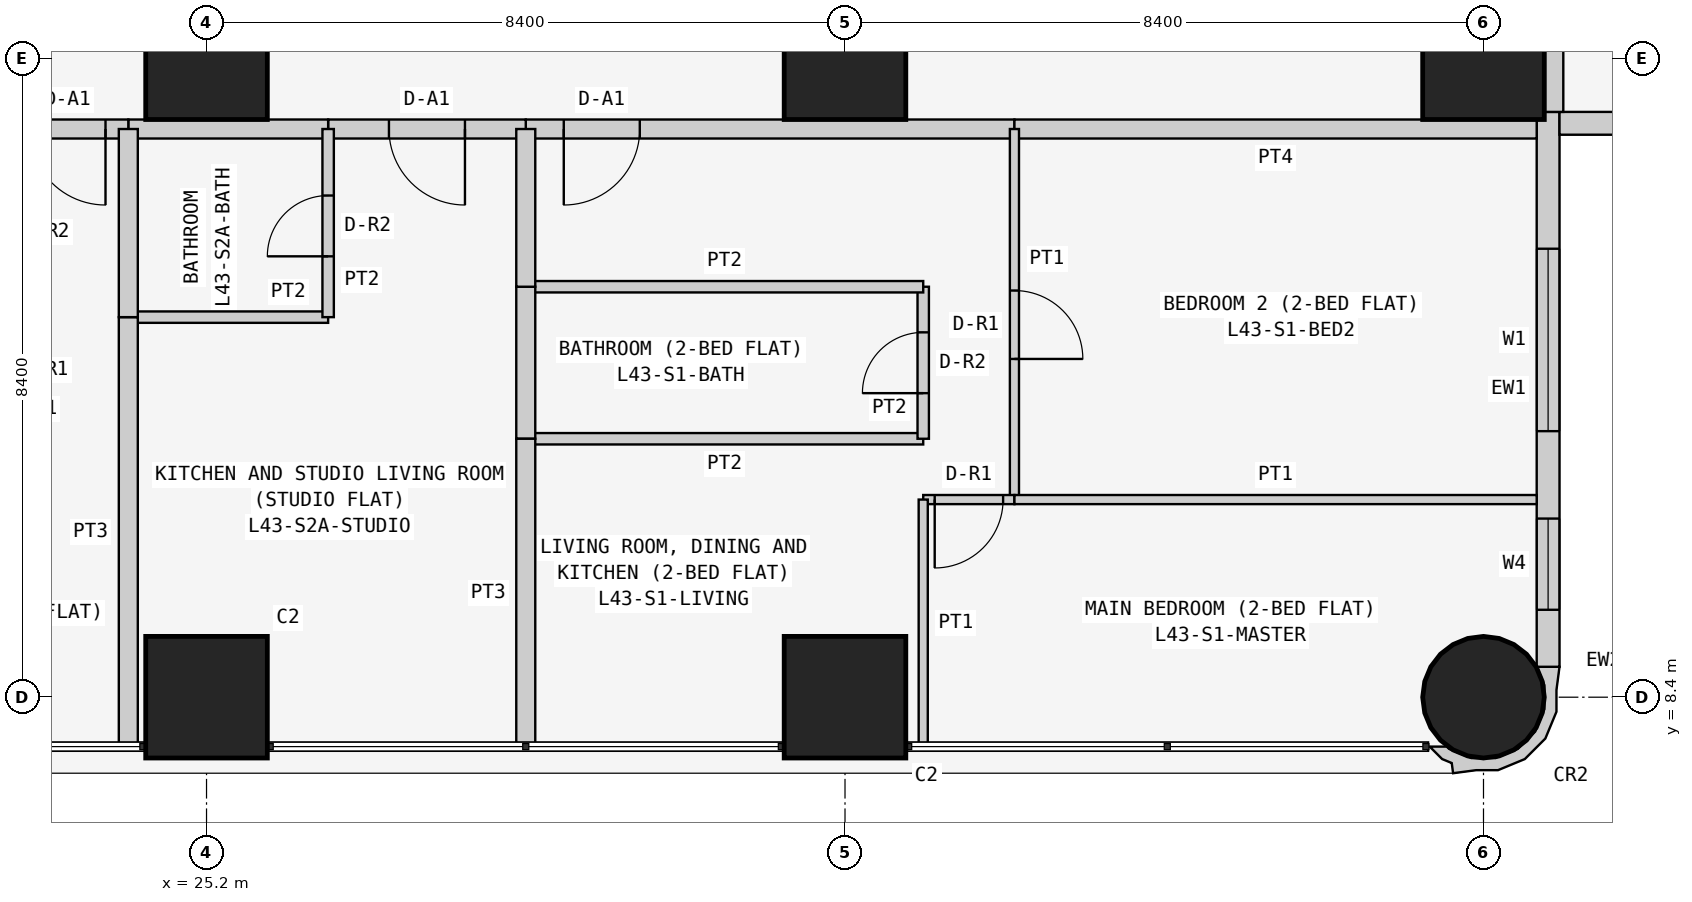
"""IFC4 building model, lengths in metres.
Left out: names, types, materials, properties, quantities, classifications, styles, units other than length and angle.
Written with IfcOpenShell. Run it as: python <this file> out.ifc"""

import sys

from ifc_helpers import new_model, si_unit, direction, frame, frame_2d, origin, origin_2d, place, context, subcontext, project, spatial, polyline, rectangle, circle, outline, extrude, element, fill, save


model = new_model("IFC4")
c1 = context("Model", 3, precision=1e-05, world=origin(), true_north=direction((0.0, 1.0)))
c2 = subcontext(c1, "Body", "Model", "MODEL_VIEW")
j1 = project(units=[si_unit("LENGTHUNIT", "METRE"), si_unit("PLANEANGLEUNIT", "RADIAN")], contexts=[c1])
p1 = place(None, origin())
s1 = spatial("IfcSite", under=j1, at=p1, CompositionType="ELEMENT")
p2 = place(p1, origin())
s2 = spatial("IfcBuilding", under=s1, at=p2, CompositionType="ELEMENT")
p3 = place(p2, frame((0.0, 0.0, 166.5)))
s3 = spatial("IfcBuildingStorey", under=s2, at=p3, CompositionType="ELEMENT", Elevation=166.5)
for number, where, z_axis, x_axis in (
    (1, (25.2, 8.4, 0.0), (0.0, 0.0, 1.0), (1.0, 0.0, 0.0)),
    (2, (25.2, 16.8, 0.0), (0.0, 0.0, 1.0), (1.0, 0.0, 0.0)),
    (3, (33.6, 8.4, 0.0), (0.0, 0.0, 1.0), (1.0, 0.0, 0.0)),
    (4, (33.6, 16.8, 0.0), (0.0, 0.0, 1.0), (1.0, 0.0, 0.0)),
):
    element("IfcColumn", number, at=place(p3, frame(where, z_axis=z_axis, x_axis=x_axis)), inside=s3, PredefinedType="COLUMN", context=c2, shape_type="SweptSolid", body=[
        extrude(rectangle(XDim=1.6, YDim=1.6, at=origin_2d()), origin(), (0.0, 0.0, 1.0), 3.6),
    ])
p4 = place(p3, frame((42.0, 8.4, 0.0), z_axis=(0.0, 0.0, 1.0), x_axis=(1.0, 0.0, 0.0)))
e5 = element("IfcColumn", 5, at=p4, inside=s3, PredefinedType="COLUMN", context=c2, shape_type="SweptSolid", body=[
    extrude(circle(Radius=0.8, at=origin_2d()), origin(), (0.0, 0.0, 1.0), 3.6),
])
p5 = place(p3, frame((42.0, 16.8, 0.0), z_axis=(0.0, 0.0, 1.0), x_axis=(1.0, 0.0, 0.0)))
e6 = element("IfcColumn", 6, at=p5, inside=s3, PredefinedType="COLUMN", context=c2, shape_type="SweptSolid", body=[
    extrude(rectangle(XDim=1.6, YDim=1.6, at=origin_2d()), origin(), (0.0, 0.0, 1.0), 3.6),
])
p6 = place(p3, frame((42.85, 8.8, 0.0), z_axis=(0.0, 0.0, 1.0), x_axis=(0.0, 1.0, 0.0)))
e7 = element("IfcWall", 7, at=p6, inside=s3, PredefinedType="SOLIDWALL", context=c2, shape_type="SweptSolid", body=[
    extrude(rectangle(XDim=7.3, YDim=0.3, at=frame_2d((3.65, 0.0))), origin(), (0.0, 0.0, 1.0), 3.45),
])
p7 = place(p6, frame((3.1, 0.0, 0.9)))
e8 = element("IfcOpeningElement", 8, at=p7, cuts=e7, PredefinedType="OPENING", context=c2, shape_type="SweptSolid", body=[
    extrude(rectangle(XDim=2.4, YDim=1.5, at=frame_2d((1.2, 0.75))), frame((0.0, 0.16, 0.0), z_axis=(0.0, -1.0, 0.0), x_axis=(1.0, 0.0, 0.0)), (0.0, 0.0, 1.0), 0.32),
])
p8 = place(p6, frame((0.75, 0.0, 0.9)))
e9 = element("IfcOpeningElement", 9, at=p8, cuts=e7, PredefinedType="OPENING", context=c2, shape_type="SweptSolid", body=[
    extrude(rectangle(XDim=1.2, YDim=1.5, at=frame_2d((0.6, 0.75))), frame((0.0, 0.16, 0.0), z_axis=(0.0, -1.0, 0.0), x_axis=(1.0, 0.0, 0.0)), (0.0, 0.0, 1.0), 0.32),
])
p9 = place(p3, frame((43.0, 15.95, 0.0), z_axis=(0.0, 0.0, 1.0), x_axis=(1.0, 0.0, 0.0)))
e10 = element("IfcWall", 10, at=p9, inside=s3, PredefinedType="SOLIDWALL", context=c2, shape_type="SweptSolid", body=[
    extrude(rectangle(XDim=15.4, YDim=0.3, at=frame_2d((7.7, 0.0))), origin(), (0.0, 0.0, 1.0), 3.45),
])
p10 = place(p9, frame((1.2, 0.0, 0.9)))
e11 = element("IfcOpeningElement", 11, at=p10, cuts=e10, PredefinedType="OPENING", context=c2, shape_type="SweptSolid", body=[
    extrude(rectangle(XDim=1.8, YDim=1.5, at=frame_2d((0.9, 0.75))), frame((0.0, 0.16, 0.0), z_axis=(0.0, -1.0, 0.0), x_axis=(1.0, 0.0, 0.0)), (0.0, 0.0, 1.0), 0.32),
])
p11 = place(p9, frame((4.95, 0.0, 1.5)))
e12 = element("IfcOpeningElement", 12, at=p11, cuts=e10, PredefinedType="OPENING", context=c2, shape_type="SweptSolid", body=[
    extrude(rectangle(XDim=0.9, YDim=0.7, at=frame_2d((0.45, 0.35))), frame((0.0, 0.16, 0.0), z_axis=(0.0, -1.0, 0.0), x_axis=(1.0, 0.0, 0.0)), (0.0, 0.0, 1.0), 0.32),
])
p12 = place(p9, frame((8.5, 0.0, 0.9)))
e13 = element("IfcOpeningElement", 13, at=p12, cuts=e10, PredefinedType="OPENING", context=c2, shape_type="SweptSolid", body=[
    extrude(rectangle(XDim=1.8, YDim=1.5, at=frame_2d((0.9, 0.75))), frame((0.0, 0.16, 0.0), z_axis=(0.0, -1.0, 0.0), x_axis=(1.0, 0.0, 0.0)), (0.0, 0.0, 1.0), 0.32),
])
p13 = place(p9, frame((12.5, 0.0, 0.0)))
e14 = element("IfcOpeningElement", 14, at=p13, cuts=e10, PredefinedType="OPENING", context=c2, shape_type="SweptSolid", body=[
    extrude(rectangle(XDim=0.9, YDim=2.4, at=frame_2d((0.45, 1.2))), frame((0.0, 0.16, 0.0), z_axis=(0.0, -1.0, 0.0), x_axis=(1.0, 0.0, 0.0)), (0.0, 0.0, 1.0), 0.32),
])
p14 = place(p9, frame((13.5, 0.0, 0.9)))
e15 = element("IfcOpeningElement", 15, at=p14, cuts=e10, PredefinedType="OPENING", context=c2, shape_type="SweptSolid", body=[
    extrude(rectangle(XDim=1.2, YDim=1.5, at=frame_2d((0.6, 0.75))), frame((0.0, 0.16, 0.0), z_axis=(0.0, -1.0, 0.0), x_axis=(1.0, 0.0, 0.0)), (0.0, 0.0, 1.0), 0.32),
])
p15 = place(p3, frame((41.352, 7.805, 0.0), z_axis=(0.0, 0.0, 1.0), x_axis=(0.343276641956, -0.93923434088, 0.0)))
e16 = element("IfcWall", 16, at=p15, inside=s3, PredefinedType="SOLIDWALL", context=c2, shape_type="SweptSolid", body=[
    extrude(outline(polyline([(-0.369, 1.89), (-0.509, 1.621), (-0.49, 1.615), (-0.479, 1.609), (-0.211, 1.62), (0.088, 1.511), (0.323, 1.295), (0.457, 1.006), (0.47, 0.688), (0.361, 0.389), (0.145, 0.154), (0.108, 0.136), (0.031, -0.075), (0.241, 0.023), (0.333, 0.124), (0.465, 0.094), (0.532, 0.393), (0.631, 0.663), (0.614, 1.044), (0.453, 1.391), (0.172, 1.649), (-0.097, 1.748), (-0.369, 1.89)])), origin(), (0.0, 0.0, 1.0), 3.45),
])
p16 = place(p3, frame((42.925, 22.571, 0.0), z_axis=(0.0, 0.0, 1.0), x_axis=(0.0, -1.0, 0.0)))
e17 = element("IfcWall", 17, at=p16, inside=s3, PredefinedType="PARTITIONING", context=c2, shape_type="SweptSolid", body=[
    extrude(rectangle(XDim=6.471, YDim=0.25, at=frame_2d((3.235, 0.0))), origin(), (0.0, 0.0, 1.0), 3.45),
])
p17 = place(p3, frame((35.829, 15.875, 0.0), z_axis=(0.0, 0.0, 1.0), x_axis=(-1.0, 0.0, 0.0)))
e18 = element("IfcWall", 18, at=p17, inside=s3, PredefinedType="PARTITIONING", context=c2, shape_type="SweptSolid", body=[
    extrude(rectangle(XDim=6.429, YDim=0.25, at=frame_2d((3.215, 0.0))), origin(), (0.0, 0.0, 1.0), 3.45),
])
p18 = place(p17, frame((4.929, 0.0, 0.0)))
e19 = element("IfcOpeningElement", 19, at=p18, cuts=e18, PredefinedType="OPENING", context=c2, shape_type="SweptSolid", body=[
    extrude(rectangle(XDim=1.0, YDim=2.1, at=frame_2d((0.5, 1.05))), frame((0.0, 0.135, 0.0), z_axis=(0.0, -1.0, 0.0), x_axis=(1.0, 0.0, 0.0)), (0.0, 0.0, 1.0), 0.27),
])
p19 = place(p3, frame((42.7, 15.875, 0.0), z_axis=(0.0, 0.0, 1.0), x_axis=(-1.0, 0.0, 0.0)))
e20 = element("IfcWall", 20, at=p19, inside=s3, PredefinedType="PARTITIONING", context=c2, shape_type="SweptSolid", body=[
    extrude(rectangle(XDim=6.871, YDim=0.25, at=frame_2d((3.436, 0.0))), origin(), (0.0, 0.0, 1.0), 3.45),
])
p20 = place(p3, frame((29.4, 15.875, 0.0), z_axis=(0.0, 0.0, 1.0), x_axis=(-1.0, 0.0, 0.0)))
e21 = element("IfcWall", 21, at=p20, inside=s3, PredefinedType="PARTITIONING", context=c2, shape_type="SweptSolid", body=[
    extrude(rectangle(XDim=2.6, YDim=0.25, at=frame_2d((1.3, 0.0))), origin(), (0.0, 0.0, 1.0), 3.45),
])
p21 = place(p20, frame((0.8, 0.0, 0.0)))
e22 = element("IfcOpeningElement", 22, at=p21, cuts=e21, PredefinedType="OPENING", context=c2, shape_type="SweptSolid", body=[
    extrude(rectangle(XDim=1.0, YDim=2.1, at=frame_2d((0.5, 1.05))), frame((0.0, 0.135, 0.0), z_axis=(0.0, -1.0, 0.0), x_axis=(1.0, 0.0, 0.0)), (0.0, 0.0, 1.0), 0.27),
])
p22 = place(p3, frame((26.8, 15.875, 0.0), z_axis=(0.0, 0.0, 1.0), x_axis=(-1.0, 0.0, 0.0)))
e23 = element("IfcWall", 23, at=p22, inside=s3, PredefinedType="PARTITIONING", context=c2, shape_type="SweptSolid", body=[
    extrude(rectangle(XDim=2.629, YDim=0.25, at=frame_2d((1.314, 0.0))), origin(), (0.0, 0.0, 1.0), 3.45),
])
p23 = place(p3, frame((24.171, 15.875, 0.0), z_axis=(0.0, 0.0, 1.0), x_axis=(-1.0, 0.0, 0.0)))
e24 = element("IfcWall", 24, at=p23, inside=s3, PredefinedType="PARTITIONING", context=c2, shape_type="SweptSolid", body=[
    extrude(rectangle(XDim=1.6, YDim=0.25, at=frame_2d((0.8, 0.0))), origin(), (0.0, 0.0, 1.0), 3.45),
])
p24 = place(p23, frame((0.3, 0.0, 0.0)))
e25 = element("IfcOpeningElement", 25, at=p24, cuts=e24, PredefinedType="OPENING", context=c2, shape_type="SweptSolid", body=[
    extrude(rectangle(XDim=1.0, YDim=2.1, at=frame_2d((0.5, 1.05))), frame((0.0, 0.135, 0.0), z_axis=(0.0, -1.0, 0.0), x_axis=(1.0, 0.0, 0.0)), (0.0, 0.0, 1.0), 0.27),
])
p25 = place(p3, frame((29.4, 11.8, 0.0), z_axis=(0.0, 0.0, 1.0), x_axis=(1.0, 0.0, 0.0)))
e26 = element("IfcWall", 26, at=p25, inside=s3, PredefinedType="PARTITIONING", context=c2, shape_type="SweptSolid", body=[
    extrude(rectangle(XDim=5.229, YDim=0.15, at=frame_2d((2.615, 0.0))), origin(), (0.0, 0.0, 1.0), 3.45),
])
p26 = place(p3, frame((34.629, 11.8, 0.0), z_axis=(0.0, 0.0, 1.0), x_axis=(0.0, 1.0, 0.0)))
e27 = element("IfcWall", 27, at=p26, inside=s3, PredefinedType="PARTITIONING", context=c2, shape_type="SweptSolid", body=[
    extrude(rectangle(XDim=2.0, YDim=0.15, at=frame_2d((1.0, 0.0))), origin(), (0.0, 0.0, 1.0), 3.45),
])
p27 = place(p26, frame((0.6, 0.0, 0.0)))
e28 = element("IfcOpeningElement", 28, at=p27, cuts=e27, PredefinedType="OPENING", context=c2, shape_type="SweptSolid", body=[
    extrude(rectangle(XDim=0.8, YDim=2.1, at=frame_2d((0.4, 1.05))), frame((0.0, 0.085, 0.0), z_axis=(0.0, -1.0, 0.0), x_axis=(1.0, 0.0, 0.0)), (0.0, 0.0, 1.0), 0.17),
])
p28 = place(p3, frame((34.629, 13.8, 0.0), z_axis=(0.0, 0.0, 1.0), x_axis=(-1.0, 0.0, 0.0)))
e29 = element("IfcWall", 29, at=p28, inside=s3, PredefinedType="PARTITIONING", context=c2, shape_type="SweptSolid", body=[
    extrude(rectangle(XDim=5.229, YDim=0.15, at=frame_2d((2.615, 0.0))), origin(), (0.0, 0.0, 1.0), 3.45),
])
p29 = place(p3, frame((29.4, 13.8, 0.0), z_axis=(0.0, 0.0, 1.0), x_axis=(0.0, -1.0, 0.0)))
e30 = element("IfcWall", 30, at=p29, inside=s3, PredefinedType="PARTITIONING", context=c2, shape_type="SweptSolid", body=[
    extrude(rectangle(XDim=2.0, YDim=0.25, at=frame_2d((1.0, 0.0))), origin(), (0.0, 0.0, 1.0), 2.848),
])
p30 = place(p3, frame((35.829, 15.875, 0.0), z_axis=(0.0, 0.0, 1.0), x_axis=(0.0, -1.0, 0.0)))
e31 = element("IfcWall", 31, at=p30, inside=s3, PredefinedType="PARTITIONING", context=c2, shape_type="SweptSolid", body=[
    extrude(rectangle(XDim=4.875, YDim=0.12, at=frame_2d((2.438, 0.0))), origin(), (0.0, 0.0, 1.0), 3.45),
])
p31 = place(p30, frame((2.125, 0.0, 0.0)))
e32 = element("IfcOpeningElement", 32, at=p31, cuts=e31, PredefinedType="OPENING", context=c2, shape_type="SweptSolid", body=[
    extrude(rectangle(XDim=0.9, YDim=2.1, at=frame_2d((0.45, 1.05))), frame((0.0, 0.07, 0.0), z_axis=(0.0, -1.0, 0.0), x_axis=(1.0, 0.0, 0.0)), (0.0, 0.0, 1.0), 0.14),
])
p32 = place(p3, frame((35.829, 11.0, 0.0), z_axis=(0.0, 0.0, 1.0), x_axis=(-1.0, 0.0, 0.0)))
e33 = element("IfcWall", 33, at=p32, inside=s3, PredefinedType="PARTITIONING", context=c2, shape_type="SweptSolid", body=[
    extrude(rectangle(XDim=1.2, YDim=0.12, at=frame_2d((0.6, 0.0))), origin(), (0.0, 0.0, 1.0), 3.45),
])
p33 = place(p32, frame((0.149, 0.0, 0.0)))
e34 = element("IfcOpeningElement", 34, at=p33, cuts=e33, PredefinedType="OPENING", context=c2, shape_type="SweptSolid", body=[
    extrude(rectangle(XDim=0.9, YDim=2.1, at=frame_2d((0.45, 1.05))), frame((0.0, 0.07, 0.0), z_axis=(0.0, -1.0, 0.0), x_axis=(1.0, 0.0, 0.0)), (0.0, 0.0, 1.0), 0.14),
])
p34 = place(p3, frame((34.629, 11.0, 0.0), z_axis=(0.0, 0.0, 1.0), x_axis=(0.0, -1.0, 0.0)))
e35 = element("IfcWall", 35, at=p34, inside=s3, PredefinedType="PARTITIONING", context=c2, shape_type="SweptSolid", body=[
    extrude(rectangle(XDim=3.25, YDim=0.12, at=frame_2d((1.625, 0.0))), origin(), (0.0, 0.0, 1.0), 3.45),
])
p35 = place(p3, frame((29.4, 7.75, 0.0), z_axis=(0.0, 0.0, 1.0), x_axis=(0.0, 1.0, 0.0)))
e36 = element("IfcWall", 36, at=p35, inside=s3, PredefinedType="PARTITIONING", context=c2, shape_type="SweptSolid", body=[
    extrude(rectangle(XDim=4.05, YDim=0.25, at=frame_2d((2.025, 0.0))), origin(), (0.0, 0.0, 1.0), 2.848),
])
p36 = place(p3, frame((29.4, 13.8, 0.0), z_axis=(0.0, 0.0, 1.0), x_axis=(0.0, 1.0, 0.0)))
e37 = element("IfcWall", 37, at=p36, inside=s3, PredefinedType="PARTITIONING", context=c2, shape_type="SweptSolid", body=[
    extrude(rectangle(XDim=2.075, YDim=0.25, at=frame_2d((1.038, 0.0))), origin(), (0.0, 0.0, 1.0), 2.848),
])
p37 = place(p3, frame((35.829, 11.0, 0.0), z_axis=(0.0, 0.0, 1.0), x_axis=(1.0, 0.0, 0.0)))
e38 = element("IfcWall", 38, at=p37, inside=s3, PredefinedType="PARTITIONING", context=c2, shape_type="SweptSolid", body=[
    extrude(rectangle(XDim=6.871, YDim=0.12, at=frame_2d((3.436, 0.0))), origin(), (0.0, 0.0, 1.0), 3.45),
])
p38 = place(p3, frame((24.171, 13.4, 0.0), z_axis=(0.0, 0.0, 1.0), x_axis=(1.0, 0.0, 0.0)))
e39 = element("IfcWall", 39, at=p38, inside=s3, PredefinedType="PARTITIONING", context=c2, shape_type="SweptSolid", body=[
    extrude(rectangle(XDim=2.629, YDim=0.15, at=frame_2d((1.314, 0.0))), origin(), (0.0, 0.0, 1.0), 3.45),
])
p39 = place(p3, frame((26.8, 13.4, 0.0), z_axis=(0.0, 0.0, 1.0), x_axis=(0.0, 1.0, 0.0)))
e40 = element("IfcWall", 40, at=p39, inside=s3, PredefinedType="PARTITIONING", context=c2, shape_type="SweptSolid", body=[
    extrude(rectangle(XDim=2.475, YDim=0.15, at=frame_2d((1.238, 0.0))), origin(), (0.0, 0.0, 1.0), 3.45),
])
p40 = place(p39, frame((0.8, 0.0, 0.0)))
e41 = element("IfcOpeningElement", 41, at=p40, cuts=e40, PredefinedType="OPENING", context=c2, shape_type="SweptSolid", body=[
    extrude(rectangle(XDim=0.8, YDim=2.1, at=frame_2d((0.4, 1.05))), frame((0.0, 0.085, 0.0), z_axis=(0.0, -1.0, 0.0), x_axis=(1.0, 0.0, 0.0)), (0.0, 0.0, 1.0), 0.17),
])
p41 = place(p3, frame((24.171, 7.75, 0.0), z_axis=(0.0, 0.0, 1.0), x_axis=(0.0, 1.0, 0.0)))
e42 = element("IfcWall", 42, at=p41, inside=s3, PredefinedType="PARTITIONING", context=c2, shape_type="SweptSolid", body=[
    extrude(rectangle(XDim=5.65, YDim=0.25, at=frame_2d((2.825, 0.0))), origin(), (0.0, 0.0, 1.0), 3.45),
])
p42 = place(p3, frame((24.171, 13.4, 0.0), z_axis=(0.0, 0.0, 1.0), x_axis=(0.0, 1.0, 0.0)))
e43 = element("IfcWall", 43, at=p42, inside=s3, PredefinedType="PARTITIONING", context=c2, shape_type="SweptSolid", body=[
    extrude(rectangle(XDim=2.475, YDim=0.25, at=frame_2d((1.238, 0.0))), origin(), (0.0, 0.0, 1.0), 3.45),
])
p43 = place(p7, origin())
e44 = element("IfcWindow", 44, at=p43, inside=s3, PartitioningType="SINGLE_PANEL", PredefinedType="WINDOW", context=c2, shape_type="SweptSolid", body=[
    extrude(rectangle(XDim=2.4, YDim=1.5, at=frame_2d((1.2, 0.75))), frame((0.0, 0.03, 0.0), z_axis=(0.0, -1.0, 0.0), x_axis=(1.0, 0.0, 0.0)), (0.0, 0.0, 1.0), 0.06),
])
fill(e8, e44)
p44 = place(p8, origin())
e45 = element("IfcWindow", 45, at=p44, inside=s3, PartitioningType="SINGLE_PANEL", PredefinedType="WINDOW", context=c2, shape_type="SweptSolid", body=[
    extrude(rectangle(XDim=1.2, YDim=1.5, at=frame_2d((0.6, 0.75))), frame((0.0, 0.03, 0.0), z_axis=(0.0, -1.0, 0.0), x_axis=(1.0, 0.0, 0.0)), (0.0, 0.0, 1.0), 0.06),
])
fill(e9, e45)
p45 = place(p18, origin())
e46 = element("IfcDoor", 46, at=p45, inside=s3, OperationType="SINGLE_SWING_RIGHT", PredefinedType="DOOR", context=c2, shape_type="SweptSolid", body=[
    extrude(rectangle(XDim=1.0, YDim=2.1, at=frame_2d((0.5, 1.05))), frame((0.0, 0.025, 0.0), z_axis=(0.0, -1.0, 0.0), x_axis=(1.0, 0.0, 0.0)), (0.0, 0.0, 1.0), 0.05),
])
fill(e19, e46)
p46 = place(p27, origin())
e47 = element("IfcDoor", 47, at=p46, inside=s3, OperationType="SINGLE_SWING_LEFT", PredefinedType="DOOR", context=c2, shape_type="SweptSolid", body=[
    extrude(rectangle(XDim=0.8, YDim=2.1, at=frame_2d((0.4, 1.05))), frame((0.0, 0.025, 0.0), z_axis=(0.0, -1.0, 0.0), x_axis=(1.0, 0.0, 0.0)), (0.0, 0.0, 1.0), 0.05),
])
fill(e28, e47)
p47 = place(p31, origin())
e48 = element("IfcDoor", 48, at=p47, inside=s3, OperationType="SINGLE_SWING_RIGHT", PredefinedType="DOOR", context=c2, shape_type="SweptSolid", body=[
    extrude(rectangle(XDim=0.9, YDim=2.1, at=frame_2d((0.45, 1.05))), frame((0.0, 0.025, 0.0), z_axis=(0.0, -1.0, 0.0), x_axis=(1.0, 0.0, 0.0)), (0.0, 0.0, 1.0), 0.05),
])
fill(e32, e48)
p48 = place(p33, origin())
e49 = element("IfcDoor", 49, at=p48, inside=s3, OperationType="SINGLE_SWING_RIGHT", PredefinedType="DOOR", context=c2, shape_type="SweptSolid", body=[
    extrude(rectangle(XDim=0.9, YDim=2.1, at=frame_2d((0.45, 1.05))), frame((0.0, 0.025, 0.0), z_axis=(0.0, -1.0, 0.0), x_axis=(1.0, 0.0, 0.0)), (0.0, 0.0, 1.0), 0.05),
])
fill(e34, e49)
p49 = place(p21, origin())
e50 = element("IfcDoor", 50, at=p49, inside=s3, OperationType="SINGLE_SWING_LEFT", PredefinedType="DOOR", context=c2, shape_type="SweptSolid", body=[
    extrude(rectangle(XDim=1.0, YDim=2.1, at=frame_2d((0.5, 1.05))), frame((0.0, 0.025, 0.0), z_axis=(0.0, -1.0, 0.0), x_axis=(1.0, 0.0, 0.0)), (0.0, 0.0, 1.0), 0.05),
])
fill(e22, e50)
p50 = place(p40, origin())
e51 = element("IfcDoor", 51, at=p50, inside=s3, OperationType="SINGLE_SWING_LEFT", PredefinedType="DOOR", context=c2, shape_type="SweptSolid", body=[
    extrude(rectangle(XDim=0.8, YDim=2.1, at=frame_2d((0.4, 1.05))), frame((0.0, 0.025, 0.0), z_axis=(0.0, -1.0, 0.0), x_axis=(1.0, 0.0, 0.0)), (0.0, 0.0, 1.0), 0.05),
])
fill(e41, e51)
p51 = place(p24, origin())
e52 = element("IfcDoor", 52, at=p51, inside=s3, OperationType="SINGLE_SWING_LEFT", PredefinedType="DOOR", context=c2, shape_type="SweptSolid", body=[
    extrude(rectangle(XDim=1.0, YDim=2.1, at=frame_2d((0.5, 1.05))), frame((0.0, 0.025, 0.0), z_axis=(0.0, -1.0, 0.0), x_axis=(1.0, 0.0, 0.0)), (0.0, 0.0, 1.0), 0.05),
])
fill(e25, e52)
save(model, sys.argv[1])
